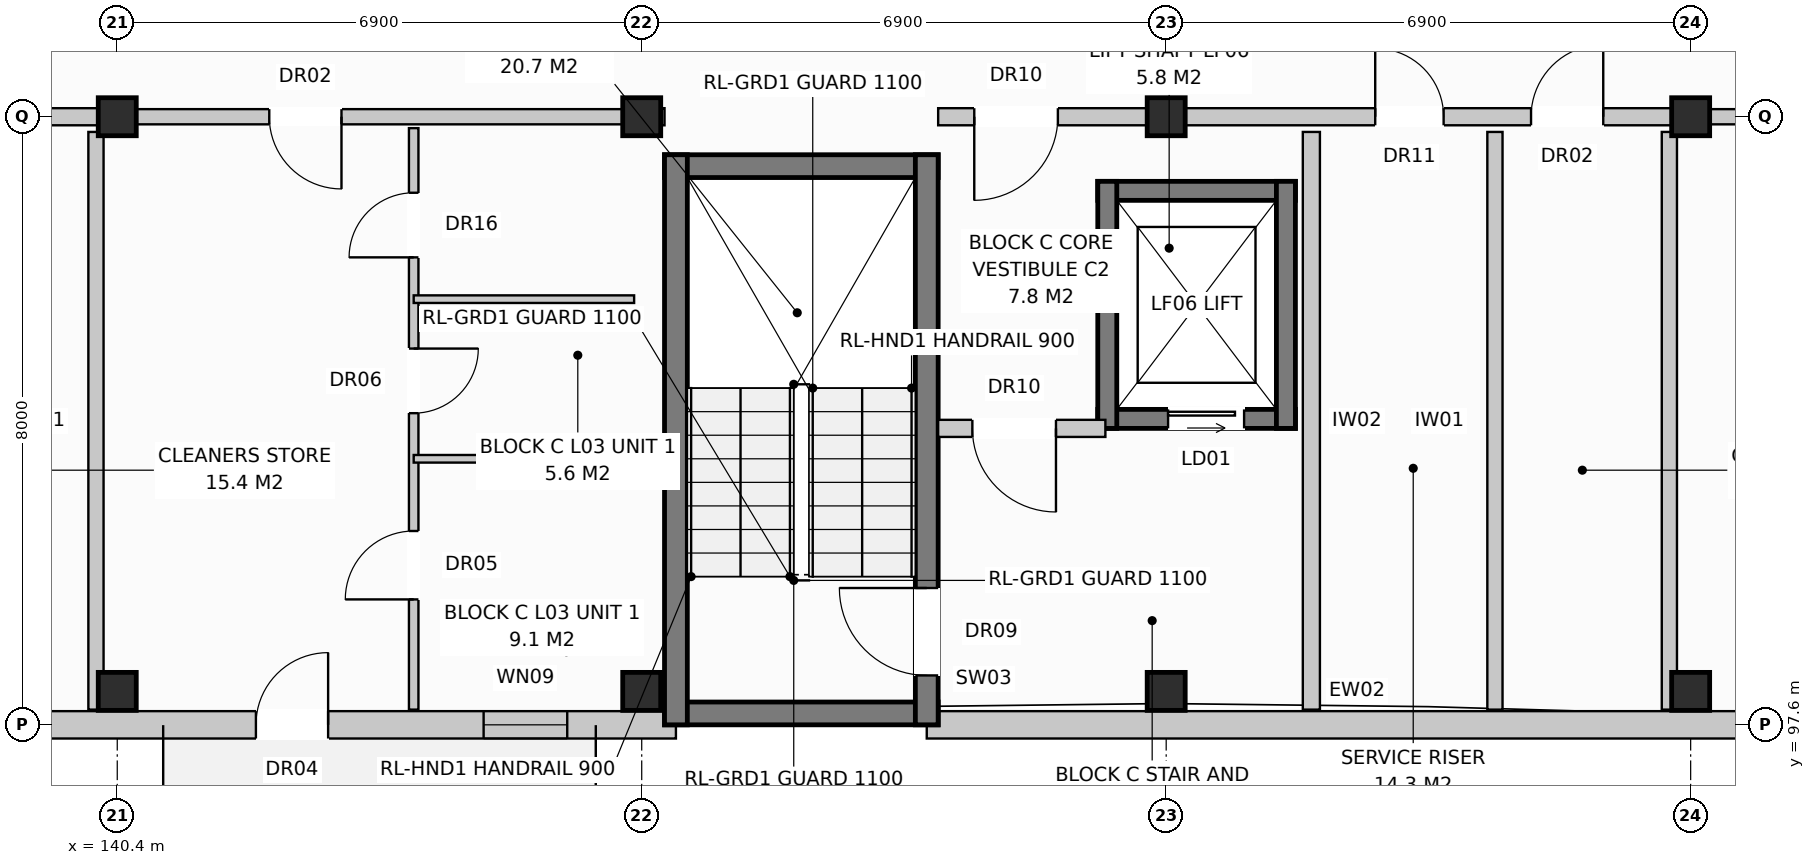
"""IFC4 building model, lengths in metres.
Left out: names, types, materials, properties, quantities, classifications, styles, units other than length and angle.
Written with IfcOpenShell. Run it as: python <this file> out.ifc"""

import sys

from ifc_helpers import new_model, si_unit, direction, frame, frame_2d, origin, origin_with_axes, origin_2d, place, context, subcontext, project, spatial, rectangle, extrude, element, fill, save


model = new_model("IFC4")
c1 = context("Model", 3, precision=1e-05, world=origin(), true_north=direction((0.0, 1.0)))
c2 = subcontext(c1, "Body", "Model", "MODEL_VIEW")
j1 = project(units=[si_unit("LENGTHUNIT", "METRE"), si_unit("PLANEANGLEUNIT", "RADIAN")], contexts=[c1])
p1 = place(None, origin())
s1 = spatial("IfcSite", under=j1, at=p1, CompositionType="ELEMENT")
p2 = place(p1, origin())
s2 = spatial("IfcBuilding", under=s1, at=p2, CompositionType="ELEMENT")
p3 = place(p2, frame((0.0, 0.0, 11.2)))
s3 = spatial("IfcBuildingStorey", under=s2, at=p3, CompositionType="ELEMENT", Elevation=11.2)
for number, where, z_axis, x_axis in (
    (1, (140.4, 98.04, 0.0), (0.0, 0.0, 1.0), (1.0, 0.0, 0.0)),
    (2, (140.4, 105.6, 0.0), (0.0, 0.0, 1.0), (1.0, 0.0, 0.0)),
    (3, (147.3, 98.04, 0.0), (0.0, 0.0, 1.0), (1.0, 0.0, 0.0)),
    (4, (147.3, 105.6, 0.0), (0.0, 0.0, 1.0), (1.0, 0.0, 0.0)),
    (5, (154.2, 98.04, 0.0), (0.0, 0.0, 1.0), (1.0, 0.0, 0.0)),
    (6, (154.2, 105.6, 0.0), (0.0, 0.0, 1.0), (1.0, 0.0, 0.0)),
    (7, (161.1, 98.04, 0.0), (0.0, 0.0, 1.0), (1.0, 0.0, 0.0)),
    (8, (161.1, 105.6, 0.0), (0.0, 0.0, 1.0), (1.0, 0.0, 0.0)),
):
    element("IfcColumn", number, at=place(p3, frame(where, z_axis=z_axis, x_axis=x_axis)), inside=s3, PredefinedType="COLUMN", context=c2, shape_type="SweptSolid", body=[
        extrude(rectangle(XDim=0.5, YDim=0.5, at=origin_2d()), origin(), (0.0, 0.0, 1.0), 3.2),
    ])
p4 = place(p3, frame((130.35, 97.6, 0.0), z_axis=(0.0, 0.0, 1.0), x_axis=(1.0, 0.0, 0.0)))
e9 = element("IfcWall", 9, at=p4, inside=s3, PredefinedType="STANDARD", context=c2, shape_type="SweptSolid", body=[
    extrude(rectangle(XDim=17.4, YDim=0.36, at=frame_2d((8.7, 0.0))), origin(), (0.0, 0.0, 1.0), 2.94),
])
p5 = place(p4, frame((11.874, 0.0, 0.0)))
e10 = element("IfcOpeningElement", 10, at=p5, cuts=e9, PredefinedType="OPENING", context=c2, shape_type="SweptSolid", body=[
    extrude(rectangle(XDim=0.95, YDim=2.1, at=frame_2d((0.475, 1.05))), frame((0.0, 0.192, 0.0), z_axis=(0.0, -1.0, 0.0), x_axis=(1.0, 0.0, 0.0)), (0.0, 0.0, 1.0), 0.384),
])
p6 = place(p4, frame((14.87, 0.0, 0.72)))
e11 = element("IfcOpeningElement", 11, at=p6, cuts=e9, PredefinedType="OPENING", context=c2, shape_type="SweptSolid", body=[
    extrude(rectangle(XDim=1.1, YDim=1.5, at=frame_2d((0.55, 0.75))), frame((0.0, 0.192, 0.0), z_axis=(0.0, -1.0, 0.0), x_axis=(1.0, 0.0, 0.0)), (0.0, 0.0, 1.0), 0.384),
])
p7 = place(p3, frame((151.05, 97.6, 0.0), z_axis=(0.0, 0.0, 1.0), x_axis=(1.0, 0.0, 0.0)))
e12 = element("IfcWall", 12, at=p7, inside=s3, PredefinedType="STANDARD", context=c2, shape_type="SweptSolid", body=[
    extrude(rectangle(XDim=16.78, YDim=0.36, at=frame_2d((8.39, 0.0))), origin(), (0.0, 0.0, 1.0), 2.94),
])
p8 = place(p7, frame((11.07, 0.0, 0.8)))
e13 = element("IfcOpeningElement", 13, at=p8, cuts=e12, PredefinedType="OPENING", context=c2, shape_type="SweptSolid", body=[
    extrude(rectangle(XDim=1.9, YDim=1.85, at=frame_2d((0.95, 0.925))), frame((0.0, 0.192, 0.0), z_axis=(0.0, -1.0, 0.0), x_axis=(1.0, 0.0, 0.0)), (0.0, 0.0, 1.0), 0.384),
])
p9 = place(p7, frame((14.87, 0.0, 0.72)))
e14 = element("IfcOpeningElement", 14, at=p9, cuts=e12, PredefinedType="OPENING", context=c2, shape_type="SweptSolid", body=[
    extrude(rectangle(XDim=1.1, YDim=1.5, at=frame_2d((0.55, 0.75))), frame((0.0, 0.192, 0.0), z_axis=(0.0, -1.0, 0.0), x_axis=(1.0, 0.0, 0.0)), (0.0, 0.0, 1.0), 0.384),
])
p10 = place(p3, frame((140.12, 97.8, 0.0), z_axis=(0.0, 0.0, 1.0), x_axis=(0.0, 1.0, 0.0)))
e15 = element("IfcWall", 15, at=p10, inside=s3, PredefinedType="PARTITIONING", context=c2, shape_type="SweptSolid", body=[
    extrude(rectangle(XDim=7.6, YDim=0.2, at=frame_2d((3.8, 0.0))), origin(), (0.0, 0.0, 1.0), 2.94),
])
p11 = place(p3, frame((130.5, 105.6, 0.0), z_axis=(0.0, 0.0, 1.0), x_axis=(1.0, 0.0, 0.0)))
e16 = element("IfcWall", 16, at=p11, inside=s3, PredefinedType="PARTITIONING", context=c2, shape_type="SweptSolid", body=[
    extrude(rectangle(XDim=9.9, YDim=0.225, at=frame_2d((4.95, 0.0))), origin(), (0.0, 0.0, 1.0), 2.38),
])
p12 = place(p11, frame((0.475, 0.0, 0.0)))
e17 = element("IfcOpeningElement", 17, at=p12, cuts=e16, PredefinedType="OPENING", context=c2, shape_type="SweptSolid", body=[
    extrude(rectangle(XDim=1.1, YDim=2.15, at=frame_2d((0.55, 1.075))), frame((0.0, 0.125, 0.0), z_axis=(0.0, -1.0, 0.0), x_axis=(1.0, 0.0, 0.0)), (0.0, 0.0, 1.0), 0.249),
])
p13 = place(p11, frame((5.75, 0.0, 0.0)))
e18 = element("IfcOpeningElement", 18, at=p13, cuts=e16, PredefinedType="OPENING", context=c2, shape_type="SweptSolid", body=[
    extrude(rectangle(XDim=0.9, YDim=2.1, at=frame_2d((0.45, 1.05))), frame((0.0, 0.125, 0.0), z_axis=(0.0, -1.0, 0.0), x_axis=(1.0, 0.0, 0.0)), (0.0, 0.0, 1.0), 0.249),
])
p14 = place(p11, frame((7.8, 0.0, 0.0)))
e19 = element("IfcOpeningElement", 19, at=p14, cuts=e16, PredefinedType="OPENING", context=c2, shape_type="SweptSolid", body=[
    extrude(rectangle(XDim=0.95, YDim=2.15, at=frame_2d((0.475, 1.075))), frame((0.0, 0.125, 0.0), z_axis=(0.0, -1.0, 0.0), x_axis=(1.0, 0.0, 0.0)), (0.0, 0.0, 1.0), 0.249),
])
for number, where, z_axis, x_axis in (
    (20, (147.6, 97.75, 0.0), (0.0, 0.0, 1.0), (1.0, 0.0, 0.0)),
    (21, (147.6, 104.95, 0.0), (0.0, 0.0, 1.0), (1.0, 0.0, 0.0)),
):
    element("IfcWall", number, at=place(p3, frame(where, z_axis=z_axis, x_axis=x_axis)), inside=s3, PredefinedType="SHEAR", context=c2, shape_type="SweptSolid", body=[
        extrude(rectangle(XDim=3.6, YDim=0.3, at=frame_2d((1.8, 0.0))), origin(), (0.0, 0.0, 1.0), 2.94),
    ])
p15 = place(p3, frame((147.75, 97.6, 0.0), z_axis=(0.0, 0.0, 1.0), x_axis=(0.0, 1.0, 0.0)))
e22 = element("IfcWall", 22, at=p15, inside=s3, PredefinedType="SHEAR", context=c2, shape_type="SweptSolid", body=[
    extrude(rectangle(XDim=7.5, YDim=0.3, at=frame_2d((3.75, 0.0))), origin(), (0.0, 0.0, 1.0), 2.94),
])
p16 = place(p3, frame((151.05, 97.6, 0.0), z_axis=(0.0, 0.0, 1.0), x_axis=(0.0, 1.0, 0.0)))
e23 = element("IfcWall", 23, at=p16, inside=s3, PredefinedType="SHEAR", context=c2, shape_type="SweptSolid", body=[
    extrude(rectangle(XDim=7.5, YDim=0.3, at=frame_2d((3.75, 0.0))), origin(), (0.0, 0.0, 1.0), 2.94),
])
p17 = place(p16, frame((0.65, 0.0, 0.0)))
e24 = element("IfcOpeningElement", 24, at=p17, cuts=e23, PredefinedType="OPENING", context=c2, shape_type="SweptSolid", body=[
    extrude(rectangle(XDim=1.15, YDim=2.15, at=frame_2d((0.575, 1.075))), frame((0.0, 0.162, 0.0), z_axis=(0.0, -1.0, 0.0), x_axis=(1.0, 0.0, 0.0)), (0.0, 0.0, 1.0), 0.324),
])
p18 = place(p3, frame((153.3, 101.625, 0.0), z_axis=(0.0, 0.0, 1.0), x_axis=(1.0, 0.0, 0.0)))
e25 = element("IfcWall", 25, at=p18, inside=s3, PredefinedType="SHEAR", context=c2, shape_type="SweptSolid", body=[
    extrude(rectangle(XDim=2.6, YDim=0.25, at=frame_2d((1.3, 0.0))), origin(), (0.0, 0.0, 1.0), 2.94),
])
p19 = place(p18, frame((0.925, 0.0, 0.0)))
e26 = element("IfcOpeningElement", 26, at=p19, cuts=e25, PredefinedType="OPENING", context=c2, shape_type="SweptSolid", body=[
    extrude(rectangle(XDim=1.0, YDim=2.1, at=frame_2d((0.5, 1.05))), frame((0.0, 0.137, 0.0), z_axis=(0.0, -1.0, 0.0), x_axis=(1.0, 0.0, 0.0)), (0.0, 0.0, 1.0), 0.274),
])
p20 = place(p3, frame((153.3, 104.625, 0.0), z_axis=(0.0, 0.0, 1.0), x_axis=(1.0, 0.0, 0.0)))
e27 = element("IfcWall", 27, at=p20, inside=s3, PredefinedType="SHEAR", context=c2, shape_type="SweptSolid", body=[
    extrude(rectangle(XDim=2.6, YDim=0.25, at=frame_2d((1.3, 0.0))), origin(), (0.0, 0.0, 1.0), 2.94),
])
for number, where, z_axis, x_axis in (
    (28, (153.425, 101.5, 0.0), (0.0, 0.0, 1.0), (0.0, 1.0, 0.0)),
    (29, (155.775, 101.5, 0.0), (0.0, 0.0, 1.0), (0.0, 1.0, 0.0)),
):
    element("IfcWall", number, at=place(p3, frame(where, z_axis=z_axis, x_axis=x_axis)), inside=s3, PredefinedType="SHEAR", context=c2, shape_type="SweptSolid", body=[
        extrude(rectangle(XDim=3.25, YDim=0.25, at=frame_2d((1.625, 0.0))), origin(), (0.0, 0.0, 1.0), 2.94),
    ])
p21 = place(p3, frame((156.11, 97.8, 0.0), z_axis=(0.0, 0.0, 1.0), x_axis=(0.0, 1.0, 0.0)))
e30 = element("IfcWall", 30, at=p21, inside=s3, PredefinedType="PARTITIONING", context=c2, shape_type="SweptSolid", body=[
    extrude(rectangle(XDim=7.6, YDim=0.225, at=frame_2d((3.8, 0.0))), origin(), (0.0, 0.0, 1.0), 2.59),
])
p22 = place(p3, frame((151.2, 101.5, 0.0), z_axis=(0.0, 0.0, 1.0), x_axis=(1.0, 0.0, 0.0)))
e31 = element("IfcWall", 31, at=p22, inside=s3, PredefinedType="PARTITIONING", context=c2, shape_type="SweptSolid", body=[
    extrude(rectangle(XDim=2.2, YDim=0.225, at=frame_2d((1.1, 0.0))), origin(), (0.0, 0.0, 1.0), 2.94),
])
p23 = place(p22, frame((0.45, 0.0, 0.0)))
e32 = element("IfcOpeningElement", 32, at=p23, cuts=e31, PredefinedType="OPENING", context=c2, shape_type="SweptSolid", body=[
    extrude(rectangle(XDim=1.1, YDim=2.15, at=frame_2d((0.55, 1.075))), frame((0.0, 0.125, 0.0), z_axis=(0.0, -1.0, 0.0), x_axis=(1.0, 0.0, 0.0)), (0.0, 0.0, 1.0), 0.249),
])
p24 = place(p3, frame((147.3, 105.6, 0.0), z_axis=(0.0, 0.0, 1.0), x_axis=(1.0, 0.0, 0.0)))
e33 = element("IfcWall", 33, at=p24, inside=s3, PredefinedType="PARTITIONING", context=c2, shape_type="SweptSolid", body=[
    extrude(rectangle(XDim=0.3, YDim=0.225, at=frame_2d((0.15, 0.0))), origin(), (0.0, 0.0, 1.0), 2.94),
])
p25 = place(p3, frame((158.525, 97.8, 0.0), z_axis=(0.0, 0.0, 1.0), x_axis=(0.0, 1.0, 0.0)))
e34 = element("IfcWall", 34, at=p25, inside=s3, PredefinedType="PARTITIONING", context=c2, shape_type="SweptSolid", body=[
    extrude(rectangle(XDim=7.6, YDim=0.2, at=frame_2d((3.8, 0.0))), origin(), (0.0, 0.0, 1.0), 2.94),
])
p26 = place(p3, frame((160.82, 97.8, 0.0), z_axis=(0.0, 0.0, 1.0), x_axis=(0.0, 1.0, 0.0)))
e35 = element("IfcWall", 35, at=p26, inside=s3, PredefinedType="PARTITIONING", context=c2, shape_type="SweptSolid", body=[
    extrude(rectangle(XDim=7.6, YDim=0.2, at=frame_2d((3.8, 0.0))), origin(), (0.0, 0.0, 1.0), 2.38),
])
p27 = place(p3, frame((151.2, 105.6, 0.0), z_axis=(0.0, 0.0, 1.0), x_axis=(1.0, 0.0, 0.0)))
e36 = element("IfcWall", 36, at=p27, inside=s3, PredefinedType="PARTITIONING", context=c2, shape_type="SweptSolid", body=[
    extrude(rectangle(XDim=9.9, YDim=0.225, at=frame_2d((4.95, 0.0))), origin(), (0.0, 0.0, 1.0), 2.38),
])
p28 = place(p27, frame((0.475, 0.0, 0.0)))
e37 = element("IfcOpeningElement", 37, at=p28, cuts=e36, PredefinedType="OPENING", context=c2, shape_type="SweptSolid", body=[
    extrude(rectangle(XDim=1.1, YDim=2.15, at=frame_2d((0.55, 1.075))), frame((0.0, 0.125, 0.0), z_axis=(0.0, -1.0, 0.0), x_axis=(1.0, 0.0, 0.0)), (0.0, 0.0, 1.0), 0.249),
])
p29 = place(p27, frame((5.75, 0.0, 0.0)))
e38 = element("IfcOpeningElement", 38, at=p29, cuts=e36, PredefinedType="OPENING", context=c2, shape_type="SweptSolid", body=[
    extrude(rectangle(XDim=0.9, YDim=2.1, at=frame_2d((0.45, 1.05))), frame((0.0, 0.125, 0.0), z_axis=(0.0, -1.0, 0.0), x_axis=(1.0, 0.0, 0.0)), (0.0, 0.0, 1.0), 0.249),
])
p30 = place(p27, frame((7.8, 0.0, 0.0)))
e39 = element("IfcOpeningElement", 39, at=p30, cuts=e36, PredefinedType="OPENING", context=c2, shape_type="SweptSolid", body=[
    extrude(rectangle(XDim=0.95, YDim=2.15, at=frame_2d((0.475, 1.075))), frame((0.0, 0.125, 0.0), z_axis=(0.0, -1.0, 0.0), x_axis=(1.0, 0.0, 0.0)), (0.0, 0.0, 1.0), 0.249),
])
p31 = place(p3, frame((140.4, 105.6, 0.0), z_axis=(0.0, 0.0, 1.0), x_axis=(1.0, 0.0, 0.0)))
e40 = element("IfcWall", 40, at=p31, inside=s3, PredefinedType="PARTITIONING", context=c2, shape_type="SweptSolid", body=[
    extrude(rectangle(XDim=6.9, YDim=0.2, at=frame_2d((3.45, 0.0))), origin(), (0.0, 0.0, 1.0), 2.38),
])
p32 = place(p31, frame((2.0, 0.0, 0.0)))
e41 = element("IfcOpeningElement", 41, at=p32, cuts=e40, PredefinedType="OPENING", context=c2, shape_type="SweptSolid", body=[
    extrude(rectangle(XDim=0.95, YDim=2.15, at=frame_2d((0.475, 1.075))), frame((0.0, 0.112, 0.0), z_axis=(0.0, -1.0, 0.0), x_axis=(1.0, 0.0, 0.0)), (0.0, 0.0, 1.0), 0.224),
])
p33 = place(p3, frame((144.3, 105.45, 0.0), z_axis=(0.0, 0.0, 1.0), x_axis=(0.0, -1.0, 0.0)))
e42 = element("IfcWall", 42, at=p33, inside=s3, PredefinedType="PARTITIONING", context=c2, shape_type="SweptSolid", body=[
    extrude(rectangle(XDim=7.65, YDim=0.125, at=frame_2d((3.825, 0.0))), origin(), (0.0, 0.0, 1.0), 2.94),
])
p34 = place(p33, frame((0.85, 0.0, 0.0)))
e43 = element("IfcOpeningElement", 43, at=p34, cuts=e42, PredefinedType="OPENING", context=c2, shape_type="SweptSolid", body=[
    extrude(rectangle(XDim=0.85, YDim=2.1, at=frame_2d((0.425, 1.05))), frame((0.0, 0.074, 0.0), z_axis=(0.0, -1.0, 0.0), x_axis=(1.0, 0.0, 0.0)), (0.0, 0.0, 1.0), 0.149),
])
p35 = place(p33, frame((2.9, 0.0, 0.0)))
e44 = element("IfcOpeningElement", 44, at=p35, cuts=e42, PredefinedType="OPENING", context=c2, shape_type="SweptSolid", body=[
    extrude(rectangle(XDim=0.85, YDim=2.05, at=frame_2d((0.425, 1.025))), frame((0.0, 0.074, 0.0), z_axis=(0.0, -1.0, 0.0), x_axis=(1.0, 0.0, 0.0)), (0.0, 0.0, 1.0), 0.149),
])
p36 = place(p33, frame((5.3, 0.0, 0.0)))
e45 = element("IfcOpeningElement", 45, at=p36, cuts=e42, PredefinedType="OPENING", context=c2, shape_type="SweptSolid", body=[
    extrude(rectangle(XDim=0.9, YDim=2.1, at=frame_2d((0.45, 1.05))), frame((0.0, 0.074, 0.0), z_axis=(0.0, -1.0, 0.0), x_axis=(1.0, 0.0, 0.0)), (0.0, 0.0, 1.0), 0.149),
])
for number, where, z_axis, x_axis in (
    (46, (144.3, 103.2, 0.0), (0.0, 0.0, 1.0), (1.0, 0.0, 0.0)),
    (47, (144.3, 101.1, 0.0), (0.0, 0.0, 1.0), (1.0, 0.0, 0.0)),
):
    element("IfcWall", number, at=place(p3, frame(where, z_axis=z_axis, x_axis=x_axis)), inside=s3, PredefinedType="PARTITIONING", context=c2, shape_type="SweptSolid", body=[
        extrude(rectangle(XDim=2.9, YDim=0.1, at=frame_2d((1.45, 0.0))), origin(), (0.0, 0.0, 1.0), 2.94),
    ])
p37 = place(p3, frame((161.1, 105.6, 0.0), z_axis=(0.0, 0.0, 1.0), x_axis=(1.0, 0.0, 0.0)))
e48 = element("IfcWall", 48, at=p37, inside=s3, PredefinedType="PARTITIONING", context=c2, shape_type="SweptSolid", body=[
    extrude(rectangle(XDim=6.9, YDim=0.2, at=frame_2d((3.45, 0.0))), origin(), (0.0, 0.0, 1.0), 2.38),
])
p38 = place(p37, frame((2.0, 0.0, 0.0)))
e49 = element("IfcOpeningElement", 49, at=p38, cuts=e48, PredefinedType="OPENING", context=c2, shape_type="SweptSolid", body=[
    extrude(rectangle(XDim=0.95, YDim=2.15, at=frame_2d((0.475, 1.075))), frame((0.0, 0.112, 0.0), z_axis=(0.0, -1.0, 0.0), x_axis=(1.0, 0.0, 0.0)), (0.0, 0.0, 1.0), 0.224),
])
p39 = place(p5, origin_with_axes())
e50 = element("IfcDoor", 50, at=p39, inside=s3, OperationType="SINGLE_SWING_RIGHT", PredefinedType="DOOR", context=c2, shape_type="SweptSolid", body=[
    extrude(rectangle(XDim=0.95, YDim=2.1, at=frame_2d((0.475, 1.05))), frame((0.0, 0.025, 0.0), z_axis=(0.0, -1.0, 0.0), x_axis=(1.0, 0.0, 0.0)), (0.0, 0.0, 1.0), 0.05),
])
fill(e10, e50)
p40 = place(p6, origin_with_axes())
e51 = element("IfcWindow", 51, at=p40, inside=s3, PartitioningType="SINGLE_PANEL", PredefinedType="WINDOW", context=c2, shape_type="SweptSolid", body=[
    extrude(rectangle(XDim=1.1, YDim=1.5, at=frame_2d((0.55, 0.75))), frame((0.0, 0.03, 0.0), z_axis=(0.0, -1.0, 0.0), x_axis=(1.0, 0.0, 0.0)), (0.0, 0.0, 1.0), 0.06),
])
fill(e11, e51)
p41 = place(p17, origin_with_axes())
e52 = element("IfcDoor", 52, at=p41, inside=s3, OperationType="SINGLE_SWING_RIGHT", PredefinedType="DOOR", context=c2, shape_type="SweptSolid", body=[
    extrude(rectangle(XDim=1.15, YDim=2.15, at=frame_2d((0.575, 1.075))), frame((0.0, 0.025, 0.0), z_axis=(0.0, -1.0, 0.0), x_axis=(1.0, 0.0, 0.0)), (0.0, 0.0, 1.0), 0.05),
])
fill(e24, e52)
p42 = place(p19, origin_with_axes())
e53 = element("IfcDoor", 53, at=p42, inside=s3, OperationType="SLIDING_TO_LEFT", PredefinedType="DOOR", context=c2, shape_type="SweptSolid", body=[
    extrude(rectangle(XDim=1.0, YDim=2.1, at=frame_2d((0.5, 1.05))), frame((0.0, 0.025, 0.0), z_axis=(0.0, -1.0, 0.0), x_axis=(1.0, 0.0, 0.0)), (0.0, 0.0, 1.0), 0.05),
])
fill(e26, e53)
p43 = place(p23, frame((1.1, 0.0, 0.0), z_axis=(0.0, 0.0, 1.0), x_axis=(-1.0, 0.0, 0.0)))
e54 = element("IfcDoor", 54, at=p43, inside=s3, OperationType="SINGLE_SWING_RIGHT", PredefinedType="DOOR", context=c2, shape_type="SweptSolid", body=[
    extrude(rectangle(XDim=1.1, YDim=2.15, at=frame_2d((0.55, 1.075))), frame((0.0, 0.025, 0.0), z_axis=(0.0, -1.0, 0.0), x_axis=(1.0, 0.0, 0.0)), (0.0, 0.0, 1.0), 0.05),
])
fill(e32, e54)
p44 = place(p28, frame((1.1, 0.0, 0.0), z_axis=(0.0, 0.0, 1.0), x_axis=(-1.0, 0.0, 0.0)))
e55 = element("IfcDoor", 55, at=p44, inside=s3, OperationType="SINGLE_SWING_LEFT", PredefinedType="DOOR", context=c2, shape_type="SweptSolid", body=[
    extrude(rectangle(XDim=1.1, YDim=2.15, at=frame_2d((0.55, 1.075))), frame((0.0, 0.025, 0.0), z_axis=(0.0, -1.0, 0.0), x_axis=(1.0, 0.0, 0.0)), (0.0, 0.0, 1.0), 0.05),
])
fill(e37, e55)
p45 = place(p29, origin_with_axes())
e56 = element("IfcDoor", 56, at=p45, inside=s3, OperationType="SINGLE_SWING_LEFT", PredefinedType="DOOR", context=c2, shape_type="SweptSolid", body=[
    extrude(rectangle(XDim=0.9, YDim=2.1, at=frame_2d((0.45, 1.05))), frame((0.0, 0.025, 0.0), z_axis=(0.0, -1.0, 0.0), x_axis=(1.0, 0.0, 0.0)), (0.0, 0.0, 1.0), 0.05),
])
fill(e38, e56)
p46 = place(p30, origin_with_axes())
e57 = element("IfcDoor", 57, at=p46, inside=s3, OperationType="SINGLE_SWING_RIGHT", PredefinedType="DOOR", context=c2, shape_type="SweptSolid", body=[
    extrude(rectangle(XDim=0.95, YDim=2.15, at=frame_2d((0.475, 1.075))), frame((0.0, 0.025, 0.0), z_axis=(0.0, -1.0, 0.0), x_axis=(1.0, 0.0, 0.0)), (0.0, 0.0, 1.0), 0.05),
])
fill(e39, e57)
p47 = place(p32, frame((0.95, 0.0, 0.0), z_axis=(0.0, 0.0, 1.0), x_axis=(-1.0, 0.0, 0.0)))
e58 = element("IfcDoor", 58, at=p47, inside=s3, OperationType="SINGLE_SWING_RIGHT", PredefinedType="DOOR", context=c2, shape_type="SweptSolid", body=[
    extrude(rectangle(XDim=0.95, YDim=2.15, at=frame_2d((0.475, 1.075))), frame((0.0, 0.025, 0.0), z_axis=(0.0, -1.0, 0.0), x_axis=(1.0, 0.0, 0.0)), (0.0, 0.0, 1.0), 0.05),
])
fill(e41, e58)
p48 = place(p34, frame((0.85, 0.0, 0.0), z_axis=(0.0, 0.0, 1.0), x_axis=(-1.0, 0.0, 0.0)))
e59 = element("IfcDoor", 59, at=p48, inside=s3, OperationType="SINGLE_SWING_RIGHT", PredefinedType="DOOR", context=c2, shape_type="SweptSolid", body=[
    extrude(rectangle(XDim=0.85, YDim=2.1, at=frame_2d((0.425, 1.05))), frame((0.0, 0.025, 0.0), z_axis=(0.0, -1.0, 0.0), x_axis=(1.0, 0.0, 0.0)), (0.0, 0.0, 1.0), 0.05),
])
fill(e43, e59)
p49 = place(p35, origin_with_axes())
e60 = element("IfcDoor", 60, at=p49, inside=s3, OperationType="SINGLE_SWING_LEFT", PredefinedType="DOOR", context=c2, shape_type="SweptSolid", body=[
    extrude(rectangle(XDim=0.85, YDim=2.05, at=frame_2d((0.425, 1.025))), frame((0.0, 0.025, 0.0), z_axis=(0.0, -1.0, 0.0), x_axis=(1.0, 0.0, 0.0)), (0.0, 0.0, 1.0), 0.05),
])
fill(e44, e60)
p50 = place(p36, frame((0.9, 0.0, 0.0), z_axis=(0.0, 0.0, 1.0), x_axis=(-1.0, 0.0, 0.0)))
e61 = element("IfcDoor", 61, at=p50, inside=s3, OperationType="SINGLE_SWING_RIGHT", PredefinedType="DOOR", context=c2, shape_type="SweptSolid", body=[
    extrude(rectangle(XDim=0.9, YDim=2.1, at=frame_2d((0.45, 1.05))), frame((0.0, 0.025, 0.0), z_axis=(0.0, -1.0, 0.0), x_axis=(1.0, 0.0, 0.0)), (0.0, 0.0, 1.0), 0.05),
])
fill(e45, e61)
save(model, sys.argv[1])
